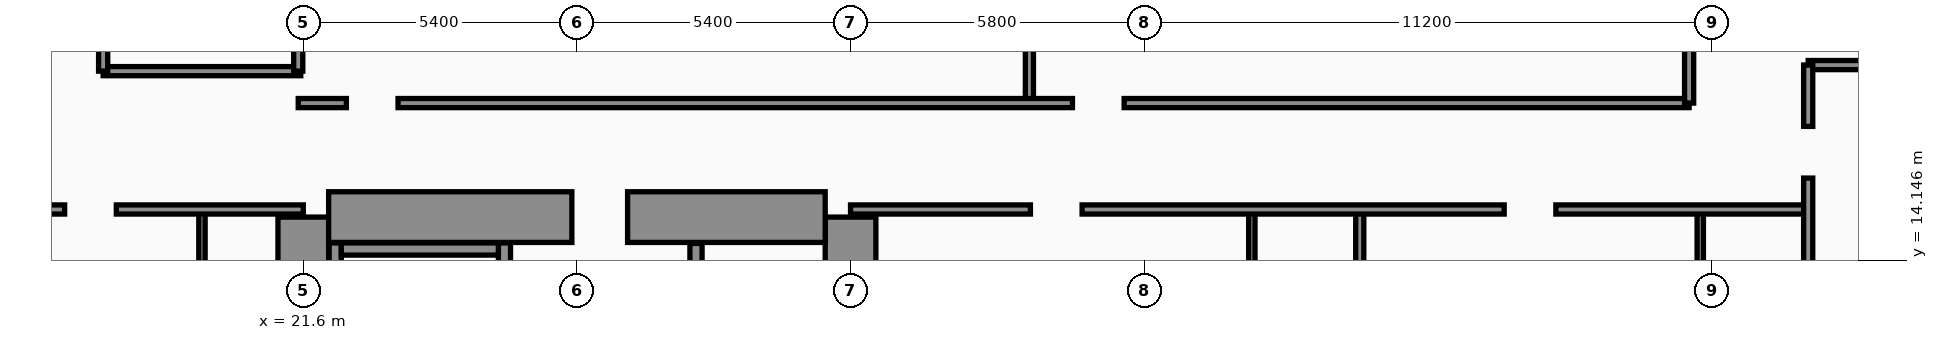
"""IFC4 building model, lengths in metres.
Left out: names, types, materials, properties, quantities, classifications, styles, units other than length and angle.
Written with IfcOpenShell. Run it as: python <this file> out.ifc"""

import sys

from ifc_helpers import new_model, si_unit, direction, frame, frame_2d, origin, place, context, subcontext, project, spatial, rectangle, extrude, element, fill, save


model = new_model("IFC4")
c1 = context("Model", 3, precision=1e-05, world=origin(), true_north=direction((0.0, 1.0)))
c2 = subcontext(c1, "Body", "Model", "MODEL_VIEW")
j1 = project(units=[si_unit("LENGTHUNIT", "METRE"), si_unit("PLANEANGLEUNIT", "RADIAN")], contexts=[c1])
p1 = place(None, origin())
s1 = spatial("IfcSite", under=j1, at=p1, CompositionType="ELEMENT")
p2 = place(p1, origin())
s2 = spatial("IfcBuilding", under=s1, at=p2, CompositionType="ELEMENT")
p3 = place(p2, frame((0.0, 0.0, 66.0)))
s3 = spatial("IfcBuildingStorey", under=s2, at=p3, CompositionType="ELEMENT", Elevation=66.0)
for number, where, z_axis, x_axis in (
    (1, (21.6, 4.6, 0.0), (0.0, 0.0, 1.0), (0.0, 1.0, 0.0)),
    (2, (32.4, 4.6, 0.0), (0.0, 0.0, 1.0), (0.0, 1.0, 0.0)),
):
    element("IfcWall", number, at=place(p3, frame(where, z_axis=z_axis, x_axis=x_axis)), inside=s3, PredefinedType="SHEAR", context=c2, shape_type="SweptSolid", body=[
        extrude(rectangle(XDim=10.4, YDim=1.0, at=frame_2d((5.2, 0.0))), origin(), (0.0, 0.0, 1.0), 3.56),
    ])
p4 = place(p3, frame((22.1, 15.0, 0.0), z_axis=(0.0, 0.0, 1.0), x_axis=(1.0, 0.0, 0.0)))
e3 = element("IfcWall", 3, at=p4, inside=s3, PredefinedType="SHEAR", context=c2, shape_type="SweptSolid", body=[
    extrude(rectangle(XDim=9.8, YDim=1.0, at=frame_2d((4.9, 0.0))), origin(), (0.0, 0.0, 1.0), 3.56),
])
p5 = place(p4, frame((4.8, 0.0, 0.0)))
e4 = element("IfcOpeningElement", 4, at=p5, cuts=e3, PredefinedType="OPENING", context=c2, shape_type="SweptSolid", body=[
    extrude(rectangle(XDim=1.1, YDim=2.2, at=frame_2d((0.55, 1.1))), frame((0.0, 0.51, 0.0), z_axis=(0.0, -1.0, 0.0), x_axis=(1.0, 0.0, 0.0)), (0.0, 0.0, 1.0), 1.02),
])
p6 = place(p3, frame((22.23, 5.1, 0.0), z_axis=(0.0, 0.0, 1.0), x_axis=(0.0, 1.0, 0.0)))
e5 = element("IfcWall", 5, at=p6, inside=s3, PredefinedType="SOLIDWALL", context=c2, shape_type="SweptSolid", body=[
    extrude(rectangle(XDim=9.39, YDim=0.24, at=frame_2d((4.695, 0.0))), origin(), (0.0, 0.0, 1.0), 3.56),
])
p7 = place(p3, frame((25.57, 5.1, 0.0), z_axis=(0.0, 0.0, 1.0), x_axis=(0.0, 1.0, 0.0)))
e6 = element("IfcWall", 6, at=p7, inside=s3, PredefinedType="SOLIDWALL", context=c2, shape_type="SweptSolid", body=[
    extrude(rectangle(XDim=9.39, YDim=0.24, at=frame_2d((4.695, 0.0))), origin(), (0.0, 0.0, 1.0), 3.56),
])
p8 = place(p7, frame((0.35, 0.0, 0.0)))
e7 = element("IfcOpeningElement", 7, at=p8, cuts=e6, PredefinedType="OPENING", context=c2, shape_type="SweptSolid", body=[
    extrude(rectangle(XDim=1.15, YDim=2.2, at=frame_2d((0.575, 1.1))), frame((0.0, 0.13, 0.0), z_axis=(0.0, -1.0, 0.0), x_axis=(1.0, 0.0, 0.0)), (0.0, 0.0, 1.0), 0.26),
])
p9 = place(p3, frame((22.35, 14.37, 0.0), z_axis=(0.0, 0.0, 1.0), x_axis=(1.0, 0.0, 0.0)))
e8 = element("IfcWall", 8, at=p9, inside=s3, PredefinedType="SOLIDWALL", context=c2, shape_type="SweptSolid", body=[
    extrude(rectangle(XDim=3.1, YDim=0.24, at=frame_2d((1.55, 0.0))), origin(), (0.0, 0.0, 1.0), 3.56),
])
p10 = place(p3, frame((29.35, 5.12, 0.0), z_axis=(0.0, 0.0, 1.0), x_axis=(0.0, 1.0, 0.0)))
e9 = element("IfcWall", 9, at=p10, inside=s3, PredefinedType="SOLIDWALL", context=c2, shape_type="SweptSolid", body=[
    extrude(rectangle(XDim=9.36, YDim=0.24, at=frame_2d((4.68, 0.0))), origin(), (0.0, 0.0, 1.0), 3.56),
])
p11 = place(p10, frame((0.55, 0.0, 0.0)))
e10 = element("IfcOpeningElement", 10, at=p11, cuts=e9, PredefinedType="OPENING", context=c2, shape_type="SweptSolid", body=[
    extrude(rectangle(XDim=1.3, YDim=2.35, at=frame_2d((0.65, 1.175))), frame((0.0, 0.13, 0.0), z_axis=(0.0, -1.0, 0.0), x_axis=(1.0, 0.0, 0.0)), (0.0, 0.0, 1.0), 0.26),
])
p12 = place(p3, frame((19.6, 2.44, 0.0), z_axis=(0.0, 0.0, 1.0), x_axis=(0.0, 1.0, 0.0)))
e11 = element("IfcWall", 11, at=p12, inside=s3, PredefinedType="PARTITIONING", context=c2, shape_type="SweptSolid", body=[
    extrude(rectangle(XDim=12.71, YDim=0.125, at=frame_2d((6.355, 0.0))), origin(), (0.0, 0.0, 1.0), 2.34),
])
p13 = place(p12, frame((4.34, 0.0, 0.0)))
e12 = element("IfcOpeningElement", 12, at=p13, cuts=e11, PredefinedType="OPENING", context=c2, shape_type="SweptSolid", body=[
    extrude(rectangle(XDim=0.96, YDim=2.2, at=frame_2d((0.48, 1.1))), frame((0.0, 0.073, 0.0), z_axis=(0.0, -1.0, 0.0), x_axis=(1.0, 0.0, 0.0)), (0.0, 0.0, 1.0), 0.145),
])
p14 = place(p12, frame((10.18, 0.0, 0.0)))
e13 = element("IfcOpeningElement", 13, at=p14, cuts=e11, PredefinedType="OPENING", context=c2, shape_type="SweptSolid", body=[
    extrude(rectangle(XDim=0.9, YDim=2.15, at=frame_2d((0.45, 1.075))), frame((0.0, 0.073, 0.0), z_axis=(0.0, -1.0, 0.0), x_axis=(1.0, 0.0, 0.0)), (0.0, 0.0, 1.0), 0.145),
])
p15 = place(p3, frame((15.15, 15.15, 0.0), z_axis=(0.0, 0.0, 1.0), x_axis=(1.0, 0.0, 0.0)))
e14 = element("IfcWall", 14, at=p15, inside=s3, PredefinedType="PARTITIONING", context=c2, shape_type="SweptSolid", body=[
    extrude(rectangle(XDim=6.45, YDim=0.18, at=frame_2d((3.225, 0.0))), origin(), (0.0, 0.0, 1.0), 2.34),
])
p16 = place(p15, frame((1.74, 0.0, 0.0)))
e15 = element("IfcOpeningElement", 15, at=p16, cuts=e14, PredefinedType="OPENING", context=c2, shape_type="SweptSolid", body=[
    extrude(rectangle(XDim=1.02, YDim=2.2, at=frame_2d((0.51, 1.1))), frame((0.0, 0.1, 0.0), z_axis=(0.0, -1.0, 0.0), x_axis=(1.0, 0.0, 0.0)), (0.0, 0.0, 1.0), 0.2),
])
p17 = place(p3, frame((17.65, 17.88, 0.0), z_axis=(0.0, 0.0, 1.0), x_axis=(1.0, 0.0, 0.0)))
e16 = element("IfcWall", 16, at=p17, inside=s3, PredefinedType="PARTITIONING", context=c2, shape_type="SweptSolid", body=[
    extrude(rectangle(XDim=3.9, YDim=0.18, at=frame_2d((1.95, 0.0))), origin(), (0.0, 0.0, 1.0), 3.56),
])
p18 = place(p3, frame((21.5, 17.88, 0.0), z_axis=(0.0, 0.0, 1.0), x_axis=(0.0, 1.0, 0.0)))
e17 = element("IfcWall", 17, at=p18, inside=s3, PredefinedType="PARTITIONING", context=c2, shape_type="SweptSolid", body=[
    extrude(rectangle(XDim=6.44, YDim=0.18, at=frame_2d((3.22, 0.0))), origin(), (0.0, 0.0, 1.0), 3.09),
])
p19 = place(p3, frame((17.65, 17.88, 0.0), z_axis=(0.0, 0.0, 1.0), x_axis=(0.0, 1.0, 0.0)))
e18 = element("IfcWall", 18, at=p19, inside=s3, PredefinedType="PARTITIONING", context=c2, shape_type="SweptSolid", body=[
    extrude(rectangle(XDim=6.44, YDim=0.18, at=frame_2d((3.22, 0.0))), origin(), (0.0, 0.0, 1.0), 3.09),
])
p20 = place(p19, frame((0.65, 0.0, 0.0)))
e19 = element("IfcOpeningElement", 19, at=p20, cuts=e18, PredefinedType="OPENING", context=c2, shape_type="SweptSolid", body=[
    extrude(rectangle(XDim=0.98, YDim=2.15, at=frame_2d((0.49, 1.075))), frame((0.0, 0.1, 0.0), z_axis=(0.0, -1.0, 0.0), x_axis=(1.0, 0.0, 0.0)), (0.0, 0.0, 1.0), 0.2),
])
p21 = place(p19, frame((3.97, 0.0, 0.0)))
e20 = element("IfcOpeningElement", 20, at=p21, cuts=e18, PredefinedType="OPENING", context=c2, shape_type="SweptSolid", body=[
    extrude(rectangle(XDim=0.96, YDim=2.2, at=frame_2d((0.48, 1.1))), frame((0.0, 0.1, 0.0), z_axis=(0.0, -1.0, 0.0), x_axis=(1.0, 0.0, 0.0)), (0.0, 0.0, 1.0), 0.2),
])
p22 = place(p3, frame((40.32, 2.44, 0.0), z_axis=(0.0, 0.0, 1.0), x_axis=(0.0, 1.0, 0.0)))
e21 = element("IfcWall", 21, at=p22, inside=s3, PredefinedType="PARTITIONING", context=c2, shape_type="SweptSolid", body=[
    extrude(rectangle(XDim=12.71, YDim=0.125, at=frame_2d((6.355, 0.0))), origin(), (0.0, 0.0, 1.0), 2.84),
])
p23 = place(p22, frame((4.35, 0.0, 0.0)))
e22 = element("IfcOpeningElement", 22, at=p23, cuts=e21, PredefinedType="OPENING", context=c2, shape_type="SweptSolid", body=[
    extrude(rectangle(XDim=0.96, YDim=2.2, at=frame_2d((0.48, 1.1))), frame((0.0, 0.073, 0.0), z_axis=(0.0, -1.0, 0.0), x_axis=(1.0, 0.0, 0.0)), (0.0, 0.0, 1.0), 0.145),
])
p24 = place(p22, frame((10.21, 0.0, 0.0)))
e23 = element("IfcOpeningElement", 23, at=p24, cuts=e21, PredefinedType="OPENING", context=c2, shape_type="SweptSolid", body=[
    extrude(rectangle(XDim=0.9, YDim=2.15, at=frame_2d((0.45, 1.075))), frame((0.0, 0.073, 0.0), z_axis=(0.0, -1.0, 0.0), x_axis=(1.0, 0.0, 0.0)), (0.0, 0.0, 1.0), 0.145),
])
p25 = place(p3, frame((49.17, 2.44, 0.0), z_axis=(0.0, 0.0, 1.0), x_axis=(0.0, 1.0, 0.0)))
e24 = element("IfcWall", 24, at=p25, inside=s3, PredefinedType="PARTITIONING", context=c2, shape_type="SweptSolid", body=[
    extrude(rectangle(XDim=12.71, YDim=0.125, at=frame_2d((6.355, 0.0))), origin(), (0.0, 0.0, 1.0), 2.84),
])
p26 = place(p25, frame((4.35, 0.0, 0.0)))
e25 = element("IfcOpeningElement", 25, at=p26, cuts=e24, PredefinedType="OPENING", context=c2, shape_type="SweptSolid", body=[
    extrude(rectangle(XDim=0.96, YDim=2.2, at=frame_2d((0.48, 1.1))), frame((0.0, 0.073, 0.0), z_axis=(0.0, -1.0, 0.0), x_axis=(1.0, 0.0, 0.0)), (0.0, 0.0, 1.0), 0.145),
])
p27 = place(p25, frame((10.21, 0.0, 0.0)))
e26 = element("IfcOpeningElement", 26, at=p27, cuts=e24, PredefinedType="OPENING", context=c2, shape_type="SweptSolid", body=[
    extrude(rectangle(XDim=0.9, YDim=2.15, at=frame_2d((0.45, 1.075))), frame((0.0, 0.073, 0.0), z_axis=(0.0, -1.0, 0.0), x_axis=(1.0, 0.0, 0.0)), (0.0, 0.0, 1.0), 0.145),
])
p28 = place(p3, frame((42.45, 2.44, 0.0), z_axis=(0.0, 0.0, 1.0), x_axis=(0.0, 1.0, 0.0)))
e27 = element("IfcWall", 27, at=p28, inside=s3, PredefinedType="PARTITIONING", context=c2, shape_type="SweptSolid", body=[
    extrude(rectangle(XDim=12.71, YDim=0.16, at=frame_2d((6.355, 0.0))), origin(), (0.0, 0.0, 1.0), 3.04),
])
p29 = place(p3, frame((32.4, 15.15, 0.0), z_axis=(0.0, 0.0, 1.0), x_axis=(1.0, 0.0, 0.0)))
e28 = element("IfcWall", 28, at=p29, inside=s3, PredefinedType="PARTITIONING", context=c2, shape_type="SweptSolid", body=[
    extrude(rectangle(XDim=18.9, YDim=0.18, at=frame_2d((9.45, 0.0))), origin(), (0.0, 0.0, 1.0), 2.84),
])
p30 = place(p29, frame((3.55, 0.0, 0.0)))
e29 = element("IfcOpeningElement", 29, at=p30, cuts=e28, PredefinedType="OPENING", context=c2, shape_type="SweptSolid", body=[
    extrude(rectangle(XDim=1.02, YDim=2.2, at=frame_2d((0.51, 1.1))), frame((0.0, 0.1, 0.0), z_axis=(0.0, -1.0, 0.0), x_axis=(1.0, 0.0, 0.0)), (0.0, 0.0, 1.0), 0.2),
])
p31 = place(p29, frame((12.9, 0.0, 0.0)))
e30 = element("IfcOpeningElement", 30, at=p31, cuts=e28, PredefinedType="OPENING", context=c2, shape_type="SweptSolid", body=[
    extrude(rectangle(XDim=1.02, YDim=2.2, at=frame_2d((0.51, 1.1))), frame((0.0, 0.1, 0.0), z_axis=(0.0, -1.0, 0.0), x_axis=(1.0, 0.0, 0.0)), (0.0, 0.0, 1.0), 0.2),
])
p32 = place(p3, frame((35.93, 17.25, 0.0), z_axis=(0.0, 0.0, 1.0), x_axis=(0.0, 1.0, 0.0)))
e31 = element("IfcWall", 31, at=p32, inside=s3, PredefinedType="PARTITIONING", context=c2, shape_type="SweptSolid", body=[
    extrude(rectangle(XDim=14.0, YDim=0.16, at=frame_2d((7.0, 0.0))), origin(), (0.0, 0.0, 1.0), 2.84),
])
p33 = place(p3, frame((21.5, 17.25, 0.0), z_axis=(0.0, 0.0, 1.0), x_axis=(1.0, 0.0, 0.0)))
e32 = element("IfcWall", 32, at=p33, inside=s3, PredefinedType="PARTITIONING", context=c2, shape_type="SweptSolid", body=[
    extrude(rectangle(XDim=27.45, YDim=0.18, at=frame_2d((13.725, 0.0))), origin(), (0.0, 0.0, 1.0), 2.84),
])
p34 = place(p33, frame((0.95, 0.0, 0.0)))
e33 = element("IfcOpeningElement", 33, at=p34, cuts=e32, PredefinedType="OPENING", context=c2, shape_type="SweptSolid", body=[
    extrude(rectangle(XDim=1.02, YDim=2.2, at=frame_2d((0.51, 1.1))), frame((0.0, 0.1, 0.0), z_axis=(0.0, -1.0, 0.0), x_axis=(1.0, 0.0, 0.0)), (0.0, 0.0, 1.0), 0.2),
])
p35 = place(p33, frame((15.28, 0.0, 0.0)))
e34 = element("IfcOpeningElement", 34, at=p35, cuts=e32, PredefinedType="OPENING", context=c2, shape_type="SweptSolid", body=[
    extrude(rectangle(XDim=1.02, YDim=2.2, at=frame_2d((0.51, 1.1))), frame((0.0, 0.1, 0.0), z_axis=(0.0, -1.0, 0.0), x_axis=(1.0, 0.0, 0.0)), (0.0, 0.0, 1.0), 0.2),
])
p36 = place(p3, frame((48.95, 17.25, 0.0), z_axis=(0.0, 0.0, 1.0), x_axis=(0.0, 1.0, 0.0)))
e35 = element("IfcWall", 35, at=p36, inside=s3, PredefinedType="PARTITIONING", context=c2, shape_type="SweptSolid", body=[
    extrude(rectangle(XDim=20.15, YDim=0.18, at=frame_2d((10.075, 0.0))), origin(), (0.0, 0.0, 1.0), 2.84),
])
p37 = place(p3, frame((51.3, 18.0, 0.0), z_axis=(0.0, 0.0, 1.0), x_axis=(1.0, 0.0, 0.0)))
e36 = element("IfcWall", 36, at=p37, inside=s3, PredefinedType="PARTITIONING", context=c2, shape_type="SweptSolid", body=[
    extrude(rectangle(XDim=8.33, YDim=0.18, at=frame_2d((4.165, 0.0))), origin(), (0.0, 0.0, 1.0), 3.04),
])
p38 = place(p3, frame((51.3, 2.44, 0.0), z_axis=(0.0, 0.0, 1.0), x_axis=(0.0, 1.0, 0.0)))
e37 = element("IfcWall", 37, at=p38, inside=s3, PredefinedType="PARTITIONING", context=c2, shape_type="SweptSolid", body=[
    extrude(rectangle(XDim=15.56, YDim=0.18, at=frame_2d((7.78, 0.0))), origin(), (0.0, 0.0, 1.0), 3.04),
])
p39 = place(p38, frame((13.33, 0.0, 0.0)))
e38 = element("IfcOpeningElement", 38, at=p39, cuts=e37, PredefinedType="OPENING", context=c2, shape_type="SweptSolid", body=[
    extrude(rectangle(XDim=1.02, YDim=2.2, at=frame_2d((0.51, 1.1))), frame((0.0, 0.1, 0.0), z_axis=(0.0, -1.0, 0.0), x_axis=(1.0, 0.0, 0.0)), (0.0, 0.0, 1.0), 0.2),
])
p40 = place(p16, origin())
e39 = element("IfcDoor", 39, at=p40, inside=s3, OperationType="SINGLE_SWING_LEFT", PredefinedType="DOOR", context=c2, shape_type="SweptSolid", body=[
    extrude(rectangle(XDim=1.02, YDim=2.2, at=frame_2d((0.51, 1.1))), frame((0.0, 0.025, 0.0), z_axis=(0.0, -1.0, 0.0), x_axis=(1.0, 0.0, 0.0)), (0.0, 0.0, 1.0), 0.05),
])
fill(e15, e39)
p41 = place(p30, origin())
e40 = element("IfcDoor", 40, at=p41, inside=s3, OperationType="SINGLE_SWING_LEFT", PredefinedType="DOOR", context=c2, shape_type="SweptSolid", body=[
    extrude(rectangle(XDim=1.02, YDim=2.2, at=frame_2d((0.51, 1.1))), frame((0.0, 0.025, 0.0), z_axis=(0.0, -1.0, 0.0), x_axis=(1.0, 0.0, 0.0)), (0.0, 0.0, 1.0), 0.05),
])
fill(e29, e40)
p42 = place(p31, origin())
e41 = element("IfcDoor", 41, at=p42, inside=s3, OperationType="SINGLE_SWING_RIGHT", PredefinedType="DOOR", context=c2, shape_type="SweptSolid", body=[
    extrude(rectangle(XDim=1.02, YDim=2.2, at=frame_2d((0.51, 1.1))), frame((0.0, 0.025, 0.0), z_axis=(0.0, -1.0, 0.0), x_axis=(1.0, 0.0, 0.0)), (0.0, 0.0, 1.0), 0.05),
])
fill(e30, e41)
p43 = place(p34, origin())
e42 = element("IfcDoor", 42, at=p43, inside=s3, OperationType="SINGLE_SWING_RIGHT", PredefinedType="DOOR", context=c2, shape_type="SweptSolid", body=[
    extrude(rectangle(XDim=1.02, YDim=2.2, at=frame_2d((0.51, 1.1))), frame((0.0, 0.025, 0.0), z_axis=(0.0, -1.0, 0.0), x_axis=(1.0, 0.0, 0.0)), (0.0, 0.0, 1.0), 0.05),
])
fill(e33, e42)
p44 = place(p35, origin())
e43 = element("IfcDoor", 43, at=p44, inside=s3, OperationType="SINGLE_SWING_LEFT", PredefinedType="DOOR", context=c2, shape_type="SweptSolid", body=[
    extrude(rectangle(XDim=1.02, YDim=2.2, at=frame_2d((0.51, 1.1))), frame((0.0, 0.025, 0.0), z_axis=(0.0, -1.0, 0.0), x_axis=(1.0, 0.0, 0.0)), (0.0, 0.0, 1.0), 0.05),
])
fill(e34, e43)
p45 = place(p39, origin())
e44 = element("IfcDoor", 44, at=p45, inside=s3, OperationType="SINGLE_SWING_LEFT", PredefinedType="DOOR", context=c2, shape_type="SweptSolid", body=[
    extrude(rectangle(XDim=1.02, YDim=2.2, at=frame_2d((0.51, 1.1))), frame((0.0, 0.025, 0.0), z_axis=(0.0, -1.0, 0.0), x_axis=(1.0, 0.0, 0.0)), (0.0, 0.0, 1.0), 0.05),
])
fill(e38, e44)
p46 = place(p5, origin())
e45 = element("IfcDoor", 45, at=p46, inside=s3, OperationType="SINGLE_SWING_LEFT", PredefinedType="DOOR", context=c2, shape_type="SweptSolid", body=[
    extrude(rectangle(XDim=1.1, YDim=2.2, at=frame_2d((0.55, 1.1))), frame((0.0, 0.025, 0.0), z_axis=(0.0, -1.0, 0.0), x_axis=(1.0, 0.0, 0.0)), (0.0, 0.0, 1.0), 0.05),
])
fill(e4, e45)
save(model, sys.argv[1])
